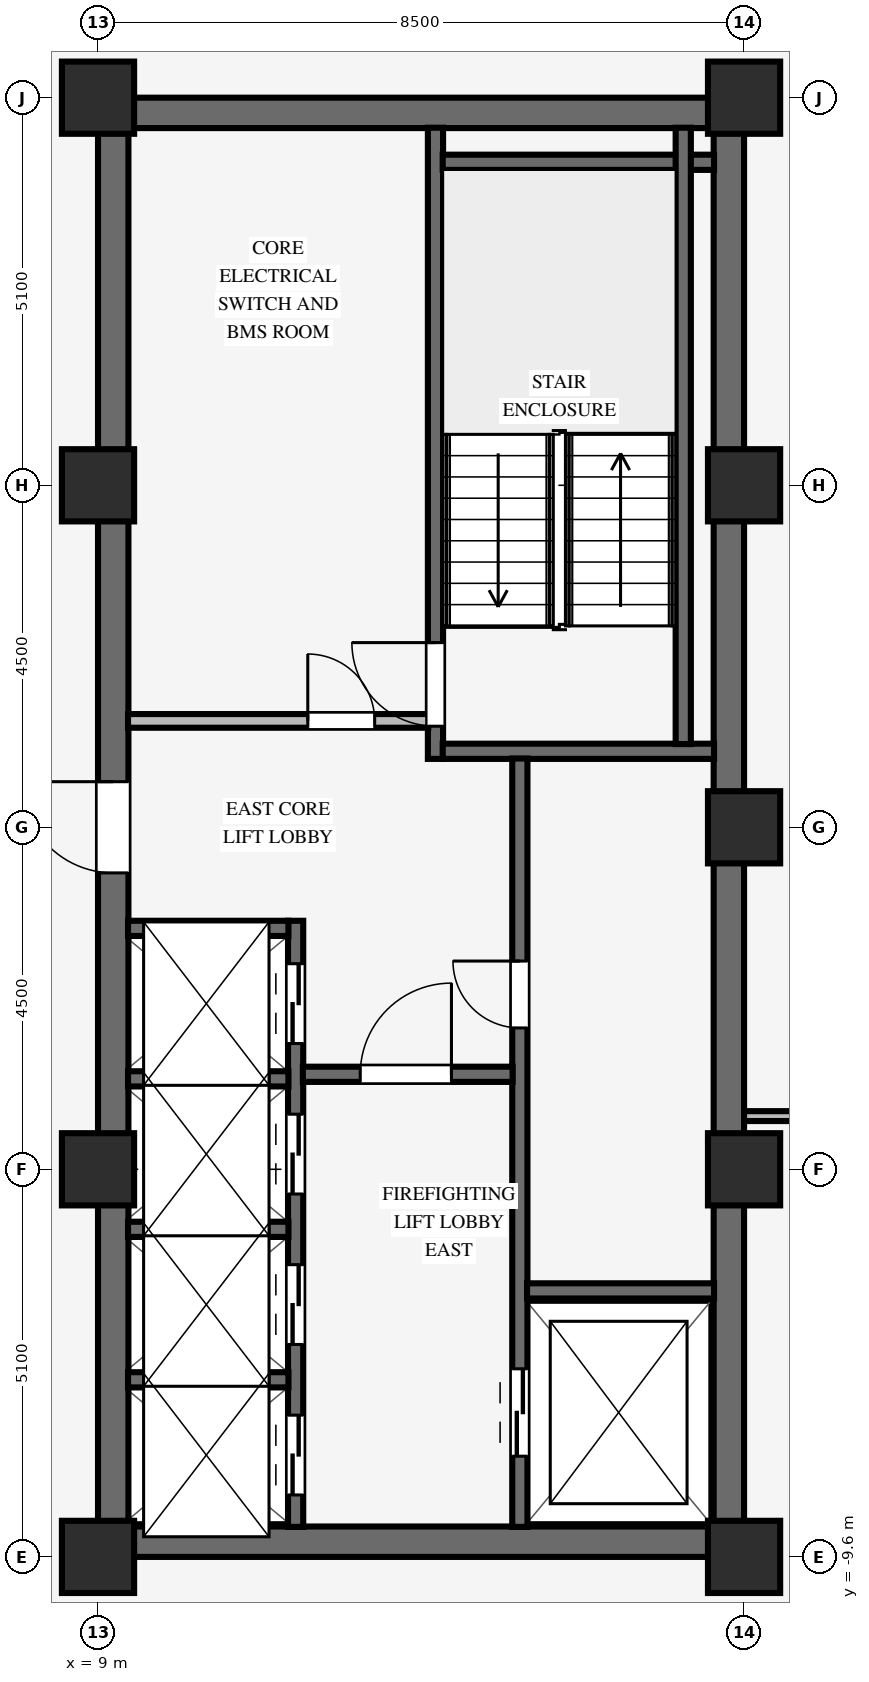
"""IFC4 building model, lengths in metres.
Left out: names, types, materials, properties, quantities, classifications, styles, units other than length and angle.
Written with IfcOpenShell. Run it as: python <this file> out.ifc"""

import sys

from ifc_helpers import new_model, si_unit, direction, frame, frame_2d, origin, origin_2d, place, context, subcontext, project, spatial, rectangle, extrude, source, transform, mapped, element, fill, save


model = new_model("IFC4")
c1 = context("Model", 3, precision=1e-05, world=origin(), true_north=direction((0.0, 1.0)))
c2 = subcontext(c1, "Body", "Model", "MODEL_VIEW")
j1 = project(units=[si_unit("LENGTHUNIT", "METRE"), si_unit("PLANEANGLEUNIT", "RADIAN")], contexts=[c1])
p1 = place(None, origin())
s1 = spatial("IfcSite", under=j1, at=p1, CompositionType="ELEMENT")
p2 = place(p1, origin())
s2 = spatial("IfcBuilding", under=s1, at=p2, CompositionType="ELEMENT")
p3 = place(p2, frame((0.0, 0.0, 182.25)))
s3 = spatial("IfcBuildingStorey", under=s2, at=p3, CompositionType="ELEMENT", Elevation=182.25)
for number, where, z_axis, x_axis in (
    (1, (9.0, -9.4, 0.0), (0.0, 0.0, 1.0), (1.0, 0.0, 0.0)),
    (2, (9.0, 9.4, 0.0), (0.0, 0.0, 1.0), (1.0, 0.0, 0.0)),
):
    element("IfcWall", number, at=place(p3, frame(where, z_axis=z_axis, x_axis=x_axis)), inside=s3, PredefinedType="SHEAR", context=c2, shape_type="SweptSolid", body=[
        extrude(rectangle(XDim=8.5, YDim=0.4, at=frame_2d((4.25, 0.0))), origin(), (0.0, 0.0, 1.0), 3.25),
    ])
p4 = place(p3, frame((9.2, -9.205, 0.0), z_axis=(0.0, 0.0, 1.0), x_axis=(0.0, 1.0, 0.0)))
e3 = element("IfcWall", 3, at=p4, inside=s3, PredefinedType="SHEAR", context=c2, shape_type="SweptSolid", body=[
    extrude(rectangle(XDim=18.41, YDim=0.4, at=frame_2d((9.205, 0.0))), origin(), (0.0, 0.0, 1.0), 3.25),
])
p5 = place(p4, frame((8.605, 0.0, 0.0)))
e4 = element("IfcOpeningElement", 4, at=p5, cuts=e3, PredefinedType="OPENING", context=c2, shape_type="SweptSolid", body=[
    extrude(rectangle(XDim=1.2, YDim=2.15, at=frame_2d((0.6, 1.075))), frame((0.0, 0.21, 0.0), z_axis=(0.0, -1.0, 0.0), x_axis=(1.0, 0.0, 0.0)), (0.0, 0.0, 1.0), 0.42),
])
p6 = place(p3, frame((17.3, -9.205, 0.0), z_axis=(0.0, 0.0, 1.0), x_axis=(0.0, 1.0, 0.0)))
e5 = element("IfcWall", 5, at=p6, inside=s3, PredefinedType="SHEAR", context=c2, shape_type="SweptSolid", body=[
    extrude(rectangle(XDim=18.41, YDim=0.4, at=frame_2d((9.205, 0.0))), origin(), (0.0, 0.0, 1.0), 3.25),
])
for number, where, z_axis, x_axis in (
    (6, (9.0, -9.6, 0.0), (0.0, 0.0, 1.0), (1.0, 0.0, 0.0)),
    (7, (9.0, -4.5, 0.0), (0.0, 0.0, 1.0), (1.0, 0.0, 0.0)),
    (8, (9.0, 4.5, 0.0), (0.0, 0.0, 1.0), (1.0, 0.0, 0.0)),
    (9, (9.0, 9.6, 0.0), (0.0, 0.0, 1.0), (1.0, 0.0, 0.0)),
    (10, (17.5, -9.6, 0.0), (0.0, 0.0, 1.0), (1.0, 0.0, 0.0)),
    (11, (17.5, -4.5, 0.0), (0.0, 0.0, 1.0), (1.0, 0.0, 0.0)),
    (12, (17.5, 4.5, 0.0), (0.0, 0.0, 1.0), (1.0, 0.0, 0.0)),
    (13, (17.5, 9.6, 0.0), (0.0, 0.0, 1.0), (1.0, 0.0, 0.0)),
    (14, (17.5, 0.0, 0.0), (0.0, 0.0, 1.0), (1.0, 0.0, 0.0)),
):
    element("IfcColumn", number, at=place(p3, frame(where, z_axis=z_axis, x_axis=x_axis)), inside=s3, PredefinedType="COLUMN", context=c2, shape_type="SweptSolid", body=[
        extrude(rectangle(XDim=0.95, YDim=0.95, at=origin_2d()), origin(), (0.0, 0.0, 1.0), 3.25),
    ])
p7 = place(p3, frame((13.44, 0.9, 0.0), z_axis=(0.0, 0.0, 1.0), x_axis=(0.0, 1.0, 0.0)))
e15 = element("IfcWall", 15, at=p7, inside=s3, PredefinedType="SHEAR", context=c2, shape_type="SweptSolid", body=[
    extrude(rectangle(XDim=8.305, YDim=0.2, at=frame_2d((4.153, 0.0))), origin(), (0.0, 0.0, 1.0), 3.25),
])
p8 = place(p7, frame((0.43, 0.0, 0.0)))
e16 = element("IfcOpeningElement", 16, at=p8, cuts=e15, PredefinedType="OPENING", context=c2, shape_type="SweptSolid", body=[
    extrude(rectangle(XDim=1.1, YDim=2.15, at=frame_2d((0.55, 1.075))), frame((0.0, 0.11, 0.0), z_axis=(0.0, -1.0, 0.0), x_axis=(1.0, 0.0, 0.0)), (0.0, 0.0, 1.0), 0.22),
])
for number, where, z_axis, x_axis in (
    (17, (13.535, 1.0, 0.0), (0.0, 0.0, 1.0), (1.0, 0.0, 0.0)),
    (18, (13.535, 8.75, 0.0), (0.0, 0.0, 1.0), (1.0, 0.0, 0.0)),
):
    element("IfcWall", number, at=place(p3, frame(where, z_axis=z_axis, x_axis=x_axis)), inside=s3, PredefinedType="SHEAR", context=c2, shape_type="SweptSolid", body=[
        extrude(rectangle(XDim=3.57, YDim=0.2, at=frame_2d((1.785, 0.0))), origin(), (0.0, 0.0, 1.0), 3.25),
    ])
p9 = place(p3, frame((16.7, 1.095, 0.0), z_axis=(0.0, 0.0, 1.0), x_axis=(0.0, 1.0, 0.0)))
e19 = element("IfcWall", 19, at=p9, inside=s3, PredefinedType="SHEAR", context=c2, shape_type="SweptSolid", body=[
    extrude(rectangle(XDim=8.11, YDim=0.2, at=frame_2d((4.055, 0.0))), origin(), (0.0, 0.0, 1.0), 3.25),
])
p10 = place(p3, frame((14.55, -9.205, 0.0), z_axis=(0.0, 0.0, 1.0), x_axis=(0.0, 1.0, 0.0)))
e20 = element("IfcWall", 20, at=p10, inside=s3, PredefinedType="SHEAR", context=c2, shape_type="SweptSolid", body=[
    extrude(rectangle(XDim=10.11, YDim=0.2, at=frame_2d((5.055, 0.0))), origin(), (0.0, 0.0, 1.0), 3.25),
])
p11 = place(p10, frame((6.565, 0.0, 0.0)))
e21 = element("IfcOpeningElement", 21, at=p11, cuts=e20, PredefinedType="OPENING", context=c2, shape_type="SweptSolid", body=[
    extrude(rectangle(XDim=0.88, YDim=2.1, at=frame_2d((0.44, 1.05))), frame((0.0, 0.11, 0.0), z_axis=(0.0, -1.0, 0.0), x_axis=(1.0, 0.0, 0.0)), (0.0, 0.0, 1.0), 0.22),
])
p12 = place(p10, frame((0.93, 0.0, 0.0)))
e22 = element("IfcOpeningElement", 22, at=p12, cuts=e20, PredefinedType="OPENING", context=c2, shape_type="SweptSolid", body=[
    extrude(rectangle(XDim=1.15, YDim=2.15, at=frame_2d((0.575, 1.075))), frame((0.0, 0.11, 0.0), z_axis=(0.0, -1.0, 0.0), x_axis=(1.0, 0.0, 0.0)), (0.0, 0.0, 1.0), 0.22),
])
p13 = place(p3, frame((14.645, -6.1, 0.0), z_axis=(0.0, 0.0, 1.0), x_axis=(1.0, 0.0, 0.0)))
e23 = element("IfcWall", 23, at=p13, inside=s3, PredefinedType="SHEAR", context=c2, shape_type="SweptSolid", body=[
    extrude(rectangle(XDim=2.46, YDim=0.2, at=frame_2d((1.23, 0.0))), origin(), (0.0, 0.0, 1.0), 3.25),
])
p14 = place(p3, frame((11.6, -9.205, 0.0), z_axis=(0.0, 0.0, 1.0), x_axis=(0.0, 1.0, 0.0)))
e24 = element("IfcWall", 24, at=p14, inside=s3, PredefinedType="SHEAR", context=c2, shape_type="SweptSolid", body=[
    extrude(rectangle(XDim=7.975, YDim=0.2, at=frame_2d((3.988, 0.0))), origin(), (0.0, 0.0, 1.0), 3.25),
])
p15 = place(p14, frame((0.42, 0.0, 0.0)))
e25 = element("IfcOpeningElement", 25, at=p15, cuts=e24, PredefinedType="OPENING", context=c2, shape_type="SweptSolid", body=[
    extrude(rectangle(XDim=1.05, YDim=2.15, at=frame_2d((0.525, 1.075))), frame((0.0, 0.11, 0.0), z_axis=(0.0, -1.0, 0.0), x_axis=(1.0, 0.0, 0.0)), (0.0, 0.0, 1.0), 0.22),
])
p16 = place(p14, frame((2.4, 0.0, 0.0)))
e26 = element("IfcOpeningElement", 26, at=p16, cuts=e24, PredefinedType="OPENING", context=c2, shape_type="SweptSolid", body=[
    extrude(rectangle(XDim=1.05, YDim=2.15, at=frame_2d((0.525, 1.075))), frame((0.0, 0.11, 0.0), z_axis=(0.0, -1.0, 0.0), x_axis=(1.0, 0.0, 0.0)), (0.0, 0.0, 1.0), 0.22),
])
p17 = place(p14, frame((4.38, 0.0, 0.0)))
e27 = element("IfcOpeningElement", 27, at=p17, cuts=e24, PredefinedType="OPENING", context=c2, shape_type="SweptSolid", body=[
    extrude(rectangle(XDim=1.05, YDim=2.15, at=frame_2d((0.525, 1.075))), frame((0.0, 0.11, 0.0), z_axis=(0.0, -1.0, 0.0), x_axis=(1.0, 0.0, 0.0)), (0.0, 0.0, 1.0), 0.22),
])
p18 = place(p14, frame((6.36, 0.0, 0.0)))
e28 = element("IfcOpeningElement", 28, at=p18, cuts=e24, PredefinedType="OPENING", context=c2, shape_type="SweptSolid", body=[
    extrude(rectangle(XDim=1.05, YDim=2.15, at=frame_2d((0.525, 1.075))), frame((0.0, 0.11, 0.0), z_axis=(0.0, -1.0, 0.0), x_axis=(1.0, 0.0, 0.0)), (0.0, 0.0, 1.0), 0.22),
])
p19 = place(p3, frame((11.695, -3.25, 0.0), z_axis=(0.0, 0.0, 1.0), x_axis=(1.0, 0.0, 0.0)))
e29 = element("IfcWall", 29, at=p19, inside=s3, PredefinedType="SHEAR", context=c2, shape_type="SweptSolid", body=[
    extrude(rectangle(XDim=2.76, YDim=0.2, at=frame_2d((1.38, 0.0))), origin(), (0.0, 0.0, 1.0), 3.25),
])
p20 = place(p19, frame((0.755, 0.0, 0.0)))
e30 = element("IfcOpeningElement", 30, at=p20, cuts=e29, PredefinedType="OPENING", context=c2, shape_type="SweptSolid", body=[
    extrude(rectangle(XDim=1.2, YDim=2.15, at=frame_2d((0.6, 1.075))), frame((0.0, 0.11, 0.0), z_axis=(0.0, -1.0, 0.0), x_axis=(1.0, 0.0, 0.0)), (0.0, 0.0, 1.0), 0.22),
])
for number, where, z_axis, x_axis in (
    (31, (9.395, -7.27, 0.0), (0.0, 0.0, 1.0), (1.0, 0.0, 0.0)),
    (32, (9.395, -5.29, 0.0), (0.0, 0.0, 1.0), (1.0, 0.0, 0.0)),
    (33, (9.395, -3.31, 0.0), (0.0, 0.0, 1.0), (1.0, 0.0, 0.0)),
    (34, (9.395, -1.33, 0.0), (0.0, 0.0, 1.0), (1.0, 0.0, 0.0)),
):
    element("IfcWall", number, at=place(p3, frame(where, z_axis=z_axis, x_axis=x_axis)), inside=s3, PredefinedType="SHEAR", context=c2, shape_type="SweptSolid", body=[
        extrude(rectangle(XDim=2.11, YDim=0.2, at=frame_2d((1.055, 0.0))), origin(), (0.0, 0.0, 1.0), 3.25),
    ])
p21 = place(p3, frame((9.395, 1.4, 0.0), z_axis=(0.0, 0.0, 1.0), x_axis=(1.0, 0.0, 0.0)))
e35 = element("IfcWall", 35, at=p21, inside=s3, PredefinedType="PARTITIONING", context=c2, shape_type="SweptSolid", body=[
    extrude(rectangle(XDim=3.95, YDim=0.18, at=frame_2d((1.975, 0.0))), origin(), (0.0, 0.0, 1.0), 3.24),
])
p22 = place(p21, frame((2.365, 0.0, 0.0)))
e36 = element("IfcOpeningElement", 36, at=p22, cuts=e35, PredefinedType="OPENING", context=c2, shape_type="SweptSolid", body=[
    extrude(rectangle(XDim=0.88, YDim=2.1, at=frame_2d((0.44, 1.05))), frame((0.0, 0.1, 0.0), z_axis=(0.0, -1.0, 0.0), x_axis=(1.0, 0.0, 0.0)), (0.0, 0.0, 1.0), 0.2),
])
p23 = place(p3, frame((17.5, -3.8, 0.0), z_axis=(0.0, 0.0, 1.0), x_axis=(1.0, 0.0, 0.0)))
e37 = element("IfcWall", 37, at=p23, inside=s3, PredefinedType="PARTITIONING", context=c2, shape_type="SweptSolid", body=[
    extrude(rectangle(XDim=4.79, YDim=0.13, at=frame_2d((2.395, 0.0))), origin(), (0.0, 0.0, 1.0), 3.24),
])
m1 = source(origin(), c2, "Body", "SweptSolid", [
    extrude(rectangle(XDim=1.1, YDim=2.15, at=frame_2d((0.55, 1.075))), frame((0.0, 0.025, 0.0), z_axis=(0.0, -1.0, 0.0), x_axis=(1.0, 0.0, 0.0)), (0.0, 0.0, 1.0), 0.05),
])
p24 = place(p8, origin())
e38 = element("IfcDoor", 38, at=p24, inside=s3, OperationType="SINGLE_SWING_RIGHT", PredefinedType="DOOR", context=c2, shape_type="MappedRepresentation", body=[
    mapped(m1, transform((0.0, 0.0, 0.0), scale=1.0)),
])
fill(e16, e38)
m2 = source(origin(), c2, "Body", "SweptSolid", [
    extrude(rectangle(XDim=0.88, YDim=2.1, at=frame_2d((0.44, 1.05))), frame((0.0, 0.025, 0.0), z_axis=(0.0, -1.0, 0.0), x_axis=(1.0, 0.0, 0.0)), (0.0, 0.0, 1.0), 0.05),
])
p25 = place(p11, origin())
e39 = element("IfcDoor", 39, at=p25, inside=s3, OperationType="SINGLE_SWING_RIGHT", PredefinedType="DOOR", context=c2, shape_type="MappedRepresentation", body=[
    mapped(m2, transform((0.0, 0.0, 0.0), scale=1.0)),
])
fill(e21, e39)
m3 = source(origin(), c2, "Body", "SweptSolid", [
    extrude(rectangle(XDim=1.2, YDim=2.15, at=frame_2d((0.6, 1.075))), frame((0.0, 0.025, 0.0), z_axis=(0.0, -1.0, 0.0), x_axis=(1.0, 0.0, 0.0)), (0.0, 0.0, 1.0), 0.05),
])
p26 = place(p20, origin())
e40 = element("IfcDoor", 40, at=p26, inside=s3, OperationType="SINGLE_SWING_RIGHT", PredefinedType="DOOR", context=c2, shape_type="MappedRepresentation", body=[
    mapped(m3, transform((0.0, 0.0, 0.0), scale=1.0)),
])
fill(e30, e40)
p27 = place(p5, origin())
e41 = element("IfcDoor", 41, at=p27, inside=s3, OperationType="SINGLE_SWING_RIGHT", PredefinedType="DOOR", context=c2, shape_type="MappedRepresentation", body=[
    mapped(m3, transform((0.0, 0.0, 0.0), scale=1.0)),
])
fill(e4, e41)
p28 = place(p22, origin())
e42 = element("IfcDoor", 42, at=p28, inside=s3, OperationType="SINGLE_SWING_LEFT", PredefinedType="DOOR", context=c2, shape_type="MappedRepresentation", body=[
    mapped(m2, transform((0.0, 0.0, 0.0), scale=1.0)),
])
fill(e36, e42)
m4 = source(origin(), c2, "Body", "SweptSolid", [
    extrude(rectangle(XDim=1.15, YDim=2.15, at=frame_2d((0.575, 1.075))), frame((0.0, 0.025, 0.0), z_axis=(0.0, -1.0, 0.0), x_axis=(1.0, 0.0, 0.0)), (0.0, 0.0, 1.0), 0.05),
])
p29 = place(p12, origin())
e43 = element("IfcDoor", 43, at=p29, inside=s3, OperationType="DOUBLE_DOOR_SLIDING", PredefinedType="DOOR", context=c2, shape_type="MappedRepresentation", body=[
    mapped(m4, transform((0.0, 0.0, 0.0), scale=1.0)),
])
fill(e22, e43)
m5 = source(origin(), c2, "Body", "SweptSolid", [
    extrude(rectangle(XDim=1.05, YDim=2.15, at=frame_2d((0.525, 1.075))), frame((0.0, 0.025, 0.0), z_axis=(0.0, -1.0, 0.0), x_axis=(1.0, 0.0, 0.0)), (0.0, 0.0, 1.0), 0.05),
])
p30 = place(p15, origin())
e44 = element("IfcDoor", 44, at=p30, inside=s3, OperationType="DOUBLE_DOOR_SLIDING", PredefinedType="DOOR", context=c2, shape_type="MappedRepresentation", body=[
    mapped(m5, transform((0.0, 0.0, 0.0), scale=1.0)),
])
fill(e25, e44)
p31 = place(p16, origin())
e45 = element("IfcDoor", 45, at=p31, inside=s3, OperationType="DOUBLE_DOOR_SLIDING", PredefinedType="DOOR", context=c2, shape_type="MappedRepresentation", body=[
    mapped(m5, transform((0.0, 0.0, 0.0), scale=1.0)),
])
fill(e26, e45)
p32 = place(p17, origin())
e46 = element("IfcDoor", 46, at=p32, inside=s3, OperationType="DOUBLE_DOOR_SLIDING", PredefinedType="DOOR", context=c2, shape_type="MappedRepresentation", body=[
    mapped(m5, transform((0.0, 0.0, 0.0), scale=1.0)),
])
fill(e27, e46)
p33 = place(p18, origin())
e47 = element("IfcDoor", 47, at=p33, inside=s3, OperationType="DOUBLE_DOOR_SLIDING", PredefinedType="DOOR", context=c2, shape_type="MappedRepresentation", body=[
    mapped(m5, transform((0.0, 0.0, 0.0), scale=1.0)),
])
fill(e28, e47)
save(model, sys.argv[1])
